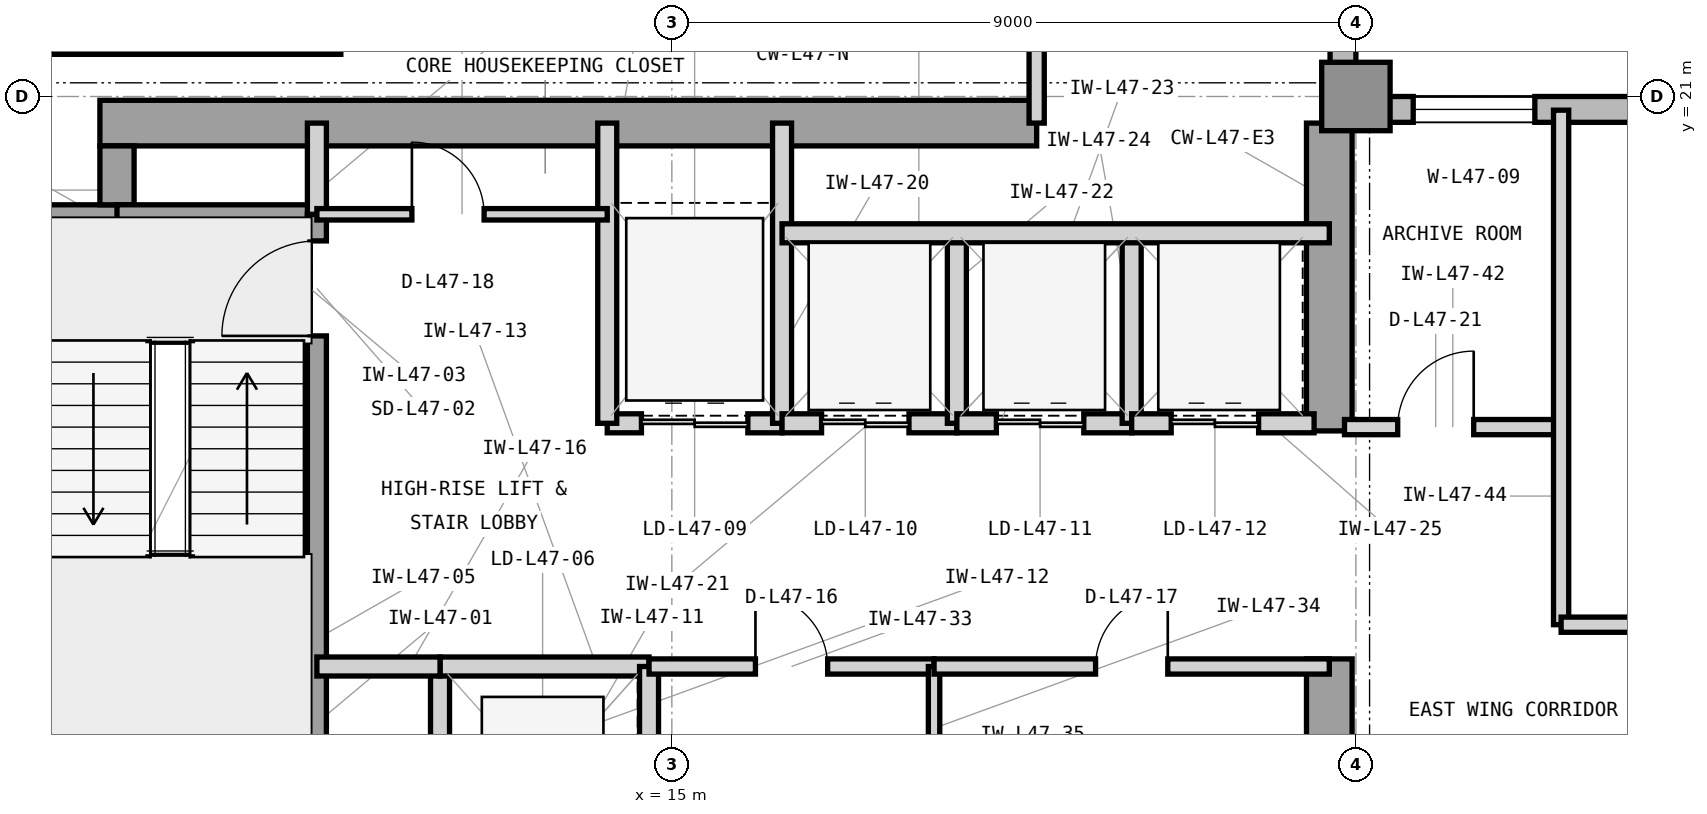
"""IFC4 building model, lengths in metres.
Left out: names, types, materials, properties, quantities, classifications, styles, units other than length and angle.
Written with IfcOpenShell. Run it as: python <this file> out.ifc"""

import sys

from ifc_helpers import new_model, si_unit, direction, frame, frame_2d, origin, origin_2d, place, context, subcontext, project, spatial, rectangle, extrude, element, fill, save


model = new_model("IFC4")
c1 = context("Model", 3, precision=1e-05, world=origin(), true_north=direction((0.0, 1.0)))
c2 = subcontext(c1, "Body", "Model", "MODEL_VIEW")
j1 = project(units=[si_unit("LENGTHUNIT", "METRE"), si_unit("PLANEANGLEUNIT", "RADIAN")], contexts=[c1])
p1 = place(None, origin())
s1 = spatial("IfcSite", under=j1, at=p1, CompositionType="ELEMENT")
p2 = place(p1, origin())
s2 = spatial("IfcBuilding", under=s1, at=p2, CompositionType="ELEMENT")
p3 = place(p2, frame((0.0, 0.0, 195.6)))
s3 = spatial("IfcBuildingStorey", under=s2, at=p3, CompositionType="ELEMENT", Elevation=195.6)
p4 = place(p3, frame((7.475, 20.65, 0.0), z_axis=(0.0, 0.0, 1.0), x_axis=(1.0, 0.0, 0.0)))
e1 = element("IfcWall", 1, at=p4, inside=s3, PredefinedType="SHEAR", context=c2, shape_type="SweptSolid", body=[
    extrude(rectangle(XDim=12.325, YDim=0.6, at=frame_2d((6.163, 0.0))), origin(), (0.0, 0.0, 1.0), 3.9),
])
p5 = place(p3, frame((23.65, 10.4, 0.0), z_axis=(0.0, 0.0, 1.0), x_axis=(0.0, 1.0, 0.0)))
e2 = element("IfcWall", 2, at=p5, inside=s3, PredefinedType="SHEAR", context=c2, shape_type="SweptSolid", body=[
    extrude(rectangle(XDim=3.2, YDim=0.6, at=frame_2d((1.6, 0.0))), origin(), (0.0, 0.0, 1.0), 3.9),
])
p6 = place(p3, frame((23.65, 16.6, 0.0), z_axis=(0.0, 0.0, 1.0), x_axis=(0.0, 1.0, 0.0)))
e3 = element("IfcWall", 3, at=p6, inside=s3, PredefinedType="SHEAR", context=c2, shape_type="SweptSolid", body=[
    extrude(rectangle(XDim=4.05, YDim=0.6, at=frame_2d((2.025, 0.0))), origin(), (0.0, 0.0, 1.0), 3.9),
])
p7 = place(p3, frame((6.65, 19.35, 0.0), z_axis=(0.0, 0.0, 1.0), x_axis=(1.0, 0.0, 0.0)))
e4 = element("IfcWall", 4, at=p7, inside=s3, PredefinedType="SHEAR", context=c2, shape_type="SweptSolid", body=[
    extrude(rectangle(XDim=1.275, YDim=0.45, at=frame_2d((0.638, 0.0))), origin(), (0.0, 0.0, 1.0), 3.9),
])
p8 = place(p3, frame((7.7, 19.575, 0.0), z_axis=(0.0, 0.0, 1.0), x_axis=(0.0, 1.0, 0.0)))
e5 = element("IfcWall", 5, at=p8, inside=s3, PredefinedType="SHEAR", context=c2, shape_type="SweptSolid", body=[
    extrude(rectangle(XDim=0.775, YDim=0.45, at=frame_2d((0.388, 0.0))), origin(), (0.0, 0.0, 1.0), 3.9),
])
p9 = place(p3, frame((24.0, 21.0, 0.0), z_axis=(0.0, 0.0, 1.0), x_axis=(1.0, 0.0, 0.0)))
e6 = element("IfcColumn", 6, at=p9, inside=s3, PredefinedType="COLUMN", context=c2, shape_type="SweptSolid", body=[
    extrude(rectangle(XDim=0.9, YDim=0.9, at=origin_2d()), origin(), (0.0, 0.0, 1.0), 3.9),
])
p10 = place(p3, frame((55.4, 20.83, 0.0), z_axis=(0.0, 0.0, 1.0), x_axis=(-1.0, 0.0, 0.0)))
e7 = element("IfcWall", 7, at=p10, inside=s3, PredefinedType="STANDARD", context=c2, shape_type="SweptSolid", body=[
    extrude(rectangle(XDim=31.4, YDim=0.34, at=frame_2d((15.7, 0.0))), origin(), (0.0, 0.0, 1.0), 3.7),
])
p11 = place(p10, frame((17.167, 0.0, 0.9)))
e8 = element("IfcOpeningElement", 8, at=p11, cuts=e7, PredefinedType="OPENING", context=c2, shape_type="SweptSolid", body=[
    extrude(rectangle(XDim=2.3, YDim=2.2, at=frame_2d((1.15, 1.1))), frame((0.0, 0.18, 0.0), z_axis=(0.0, -1.0, 0.0), x_axis=(1.0, 0.0, 0.0)), (0.0, 0.0, 1.0), 0.36),
])
p12 = place(p10, frame((29.046, 0.0, 0.9)))
e9 = element("IfcOpeningElement", 9, at=p12, cuts=e7, PredefinedType="OPENING", context=c2, shape_type="SweptSolid", body=[
    extrude(rectangle(XDim=1.6, YDim=2.2, at=frame_2d((0.8, 1.1))), frame((0.0, 0.18, 0.0), z_axis=(0.0, -1.0, 0.0), x_axis=(1.0, 0.0, 0.0)), (0.0, 0.0, 1.0), 0.36),
])
p13 = place(p10, frame((8.375, 0.0, 0.9)))
e10 = element("IfcOpeningElement", 10, at=p13, cuts=e7, PredefinedType="OPENING", context=c2, shape_type="SweptSolid", body=[
    extrude(rectangle(XDim=2.3, YDim=2.2, at=frame_2d((1.15, 1.1))), frame((0.0, 0.18, 0.0), z_axis=(0.0, -1.0, 0.0), x_axis=(1.0, 0.0, 0.0)), (0.0, 0.0, 1.0), 0.36),
])
p14 = place(p3, frame((23.83, 21.0, 0.0), z_axis=(0.0, 0.0, 1.0), x_axis=(0.0, 1.0, 0.0)))
e11 = element("IfcWall", 11, at=p14, inside=s3, PredefinedType="STANDARD", context=c2, shape_type="SweptSolid", body=[
    extrude(rectangle(XDim=22.4, YDim=0.34, at=frame_2d((11.2, 0.0))), origin(), (0.0, 0.0, 1.0), 3.7),
])
p15 = place(p3, frame((7.7, 19.45, 0.0), z_axis=(0.0, 0.0, 1.0), x_axis=(1.0, 0.0, 0.0)))
e12 = element("IfcWall", 12, at=p15, inside=s3, PredefinedType="SHEAR", context=c2, shape_type="SweptSolid", body=[
    extrude(rectangle(XDim=2.755, YDim=0.25, at=frame_2d((1.377, 0.0))), origin(), (0.0, 0.0, 1.0), 3.9),
])
p16 = place(p3, frame((10.33, 12.0, 0.0), z_axis=(0.0, 0.0, 1.0), x_axis=(0.0, 1.0, 0.0)))
e13 = element("IfcWall", 13, at=p16, inside=s3, PredefinedType="SHEAR", context=c2, shape_type="SweptSolid", body=[
    extrude(rectangle(XDim=7.45, YDim=0.25, at=frame_2d((3.725, 0.0))), origin(), (0.0, 0.0, 1.0), 3.9),
])
p17 = place(p16, frame((5.85, 0.0, 0.0)))
e14 = element("IfcOpeningElement", 14, at=p17, cuts=e13, PredefinedType="OPENING", context=c2, shape_type="SweptSolid", body=[
    extrude(rectangle(XDim=1.25, YDim=2.2, at=frame_2d((0.625, 1.1))), frame((0.0, 0.135, 0.0), z_axis=(0.0, -1.0, 0.0), x_axis=(1.0, 0.0, 0.0)), (0.0, 0.0, 1.0), 0.27),
])
p18 = place(p3, frame((10.33, 19.45, 0.0), z_axis=(0.0, 0.0, 1.0), x_axis=(0.0, 1.0, 0.0)))
e15 = element("IfcWall", 15, at=p18, inside=s3, PredefinedType="PARTITIONING", context=c2, shape_type="SweptSolid", body=[
    extrude(rectangle(XDim=1.2, YDim=0.25, at=frame_2d((0.6, 0.0))), origin(), (0.0, 0.0, 1.0), 3.69),
])
p19 = place(p3, frame((11.95, 10.5, 0.0), z_axis=(0.0, 0.0, 1.0), x_axis=(0.0, 1.0, 0.0)))
e16 = element("IfcWall", 16, at=p19, inside=s3, PredefinedType="PARTITIONING", context=c2, shape_type="SweptSolid", body=[
    extrude(rectangle(XDim=3.0, YDim=0.25, at=frame_2d((1.5, 0.0))), origin(), (0.0, 0.0, 1.0), 3.69),
])
p20 = place(p3, frame((11.95, 13.5, 0.0), z_axis=(0.0, 0.0, 1.0), x_axis=(1.0, 0.0, 0.0)))
e17 = element("IfcWall", 17, at=p20, inside=s3, PredefinedType="PARTITIONING", context=c2, shape_type="SweptSolid", body=[
    extrude(rectangle(XDim=2.75, YDim=0.25, at=frame_2d((1.375, 0.0))), origin(), (0.0, 0.0, 1.0), 3.283),
])
p21 = place(p3, frame((14.7, 10.5, 0.0), z_axis=(0.0, 0.0, 1.0), x_axis=(0.0, 1.0, 0.0)))
e18 = element("IfcWall", 18, at=p21, inside=s3, PredefinedType="PARTITIONING", context=c2, shape_type="SweptSolid", body=[
    extrude(rectangle(XDim=3.0, YDim=0.25, at=frame_2d((1.5, 0.0))), origin(), (0.0, 0.0, 1.0), 3.69),
])
p22 = place(p3, frame((10.33, 13.5, 0.0), z_axis=(0.0, 0.0, 1.0), x_axis=(1.0, 0.0, 0.0)))
e19 = element("IfcWall", 19, at=p22, inside=s3, PredefinedType="PARTITIONING", context=c2, shape_type="SweptSolid", body=[
    extrude(rectangle(XDim=1.62, YDim=0.25, at=frame_2d((0.81, 0.0))), origin(), (0.0, 0.0, 1.0), 3.283),
])
p23 = place(p3, frame((14.15, 16.7, 0.0), z_axis=(0.0, 0.0, 1.0), x_axis=(1.0, 0.0, 0.0)))
e20 = element("IfcWall", 20, at=p23, inside=s3, PredefinedType="PARTITIONING", context=c2, shape_type="SweptSolid", body=[
    extrude(rectangle(XDim=2.3, YDim=0.25, at=frame_2d((1.15, 0.0))), origin(), (0.0, 0.0, 1.0), 3.283),
])
p24 = place(p23, frame((0.45, 0.0, 0.0)))
e21 = element("IfcOpeningElement", 21, at=p24, cuts=e20, PredefinedType="OPENING", context=c2, shape_type="SweptSolid", body=[
    extrude(rectangle(XDim=1.4, YDim=2.35, at=frame_2d((0.7, 1.175))), frame((0.0, 0.135, 0.0), z_axis=(0.0, -1.0, 0.0), x_axis=(1.0, 0.0, 0.0)), (0.0, 0.0, 1.0), 0.27),
])
for number, where, z_axis, x_axis in (
    (22, (14.15, 16.7, 0.0), (0.0, 0.0, 1.0), (0.0, 1.0, 0.0)),
    (23, (16.45, 16.7, 0.0), (0.0, 0.0, 1.0), (0.0, 1.0, 0.0)),
):
    element("IfcWall", number, at=place(p3, frame(where, z_axis=z_axis, x_axis=x_axis)), inside=s3, PredefinedType="PARTITIONING", context=c2, shape_type="SweptSolid", body=[
        extrude(rectangle(XDim=3.95, YDim=0.25, at=frame_2d((1.975, 0.0))), origin(), (0.0, 0.0, 1.0), 3.69),
    ])
p25 = place(p3, frame((16.45, 16.7, 0.0), z_axis=(0.0, 0.0, 1.0), x_axis=(1.0, 0.0, 0.0)))
e24 = element("IfcWall", 24, at=p25, inside=s3, PredefinedType="PARTITIONING", context=c2, shape_type="SweptSolid", body=[
    extrude(rectangle(XDim=2.3, YDim=0.25, at=frame_2d((1.15, 0.0))), origin(), (0.0, 0.0, 1.0), 3.283),
])
p26 = place(p25, frame((0.52, 0.0, 0.0)))
e25 = element("IfcOpeningElement", 25, at=p26, cuts=e24, PredefinedType="OPENING", context=c2, shape_type="SweptSolid", body=[
    extrude(rectangle(XDim=1.15, YDim=2.25, at=frame_2d((0.575, 1.125))), frame((0.0, 0.135, 0.0), z_axis=(0.0, -1.0, 0.0), x_axis=(1.0, 0.0, 0.0)), (0.0, 0.0, 1.0), 0.27),
])
p27 = place(p3, frame((18.75, 16.7, 0.0), z_axis=(0.0, 0.0, 1.0), x_axis=(0.0, 1.0, 0.0)))
e26 = element("IfcWall", 26, at=p27, inside=s3, PredefinedType="PARTITIONING", context=c2, shape_type="SweptSolid", body=[
    extrude(rectangle(XDim=2.5, YDim=0.25, at=frame_2d((1.25, 0.0))), origin(), (0.0, 0.0, 1.0), 3.69),
])
p28 = place(p3, frame((18.75, 16.7, 0.0), z_axis=(0.0, 0.0, 1.0), x_axis=(1.0, 0.0, 0.0)))
e27 = element("IfcWall", 27, at=p28, inside=s3, PredefinedType="PARTITIONING", context=c2, shape_type="SweptSolid", body=[
    extrude(rectangle(XDim=2.3, YDim=0.25, at=frame_2d((1.15, 0.0))), origin(), (0.0, 0.0, 1.0), 3.283),
])
p29 = place(p28, frame((0.52, 0.0, 0.0)))
e28 = element("IfcOpeningElement", 28, at=p29, cuts=e27, PredefinedType="OPENING", context=c2, shape_type="SweptSolid", body=[
    extrude(rectangle(XDim=1.15, YDim=2.25, at=frame_2d((0.575, 1.125))), frame((0.0, 0.135, 0.0), z_axis=(0.0, -1.0, 0.0), x_axis=(1.0, 0.0, 0.0)), (0.0, 0.0, 1.0), 0.27),
])
p30 = place(p3, frame((21.05, 16.7, 0.0), z_axis=(0.0, 0.0, 1.0), x_axis=(0.0, 1.0, 0.0)))
e29 = element("IfcWall", 29, at=p30, inside=s3, PredefinedType="PARTITIONING", context=c2, shape_type="SweptSolid", body=[
    extrude(rectangle(XDim=2.5, YDim=0.25, at=frame_2d((1.25, 0.0))), origin(), (0.0, 0.0, 1.0), 3.69),
])
p31 = place(p3, frame((21.05, 16.7, 0.0), z_axis=(0.0, 0.0, 1.0), x_axis=(1.0, 0.0, 0.0)))
e30 = element("IfcWall", 30, at=p31, inside=s3, PredefinedType="PARTITIONING", context=c2, shape_type="SweptSolid", body=[
    extrude(rectangle(XDim=2.4, YDim=0.25, at=frame_2d((1.2, 0.0))), origin(), (0.0, 0.0, 1.0), 3.283),
])
p32 = place(p31, frame((0.52, 0.0, 0.0)))
e31 = element("IfcOpeningElement", 31, at=p32, cuts=e30, PredefinedType="OPENING", context=c2, shape_type="SweptSolid", body=[
    extrude(rectangle(XDim=1.15, YDim=2.25, at=frame_2d((0.575, 1.125))), frame((0.0, 0.135, 0.0), z_axis=(0.0, -1.0, 0.0), x_axis=(1.0, 0.0, 0.0)), (0.0, 0.0, 1.0), 0.27),
])
p33 = place(p3, frame((16.45, 19.2, 0.0), z_axis=(0.0, 0.0, 1.0), x_axis=(1.0, 0.0, 0.0)))
e32 = element("IfcWall", 32, at=p33, inside=s3, PredefinedType="PARTITIONING", context=c2, shape_type="SweptSolid", body=[
    extrude(rectangle(XDim=7.2, YDim=0.25, at=frame_2d((3.6, 0.0))), origin(), (0.0, 0.0, 1.0), 3.69),
])
p34 = place(p3, frame((14.7, 13.5, 0.0), z_axis=(0.0, 0.0, 1.0), x_axis=(1.0, 0.0, 0.0)))
e33 = element("IfcWall", 33, at=p34, inside=s3, PredefinedType="PARTITIONING", context=c2, shape_type="SweptSolid", body=[
    extrude(rectangle(XDim=3.75, YDim=0.2, at=frame_2d((1.875, 0.0))), origin(), (0.0, 0.0, 1.0), 3.283),
])
p35 = place(p34, frame((1.4, 0.0, 0.0)))
e34 = element("IfcOpeningElement", 34, at=p35, cuts=e33, PredefinedType="OPENING", context=c2, shape_type="SweptSolid", body=[
    extrude(rectangle(XDim=0.95, YDim=2.1, at=frame_2d((0.475, 1.05))), frame((0.0, 0.11, 0.0), z_axis=(0.0, -1.0, 0.0), x_axis=(1.0, 0.0, 0.0)), (0.0, 0.0, 1.0), 0.22),
])
p36 = place(p3, frame((18.45, 10.25, 0.0), z_axis=(0.0, 0.0, 1.0), x_axis=(0.0, 1.0, 0.0)))
e35 = element("IfcWall", 35, at=p36, inside=s3, PredefinedType="PARTITIONING", context=c2, shape_type="SweptSolid", body=[
    extrude(rectangle(XDim=3.25, YDim=0.15, at=frame_2d((1.625, 0.0))), origin(), (0.0, 0.0, 1.0), 3.69),
])
p37 = place(p3, frame((18.45, 13.5, 0.0), z_axis=(0.0, 0.0, 1.0), x_axis=(1.0, 0.0, 0.0)))
e36 = element("IfcWall", 36, at=p37, inside=s3, PredefinedType="PARTITIONING", context=c2, shape_type="SweptSolid", body=[
    extrude(rectangle(XDim=5.2, YDim=0.2, at=frame_2d((2.6, 0.0))), origin(), (0.0, 0.0, 1.0), 3.283),
])
p38 = place(p37, frame((2.125, 0.0, 0.0)))
e37 = element("IfcOpeningElement", 37, at=p38, cuts=e36, PredefinedType="OPENING", context=c2, shape_type="SweptSolid", body=[
    extrude(rectangle(XDim=0.95, YDim=2.1, at=frame_2d((0.475, 1.05))), frame((0.0, 0.11, 0.0), z_axis=(0.0, -1.0, 0.0), x_axis=(1.0, 0.0, 0.0)), (0.0, 0.0, 1.0), 0.22),
])
p39 = place(p3, frame((10.33, 19.45, 0.0), z_axis=(0.0, 0.0, 1.0), x_axis=(1.0, 0.0, 0.0)))
e38 = element("IfcWall", 38, at=p39, inside=s3, PredefinedType="PARTITIONING", context=c2, shape_type="SweptSolid", body=[
    extrude(rectangle(XDim=3.82, YDim=0.15, at=frame_2d((1.91, 0.0))), origin(), (0.0, 0.0, 1.0), 3.69),
])
p40 = place(p39, frame((1.25, 0.0, 0.0)))
e39 = element("IfcOpeningElement", 39, at=p40, cuts=e38, PredefinedType="OPENING", context=c2, shape_type="SweptSolid", body=[
    extrude(rectangle(XDim=0.95, YDim=2.1, at=frame_2d((0.475, 1.05))), frame((0.0, 0.085, 0.0), z_axis=(0.0, -1.0, 0.0), x_axis=(1.0, 0.0, 0.0)), (0.0, 0.0, 1.0), 0.17),
])
p41 = place(p3, frame((6.555, 21.68, 0.0), z_axis=(0.0, 0.0, 1.0), x_axis=(1.0, 0.0, 0.0)))
e40 = element("IfcWall", 40, at=p41, inside=s3, PredefinedType="SHEAR", context=c2, shape_type="SweptSolid", body=[
    extrude(rectangle(XDim=4.09, YDim=0.25, at=frame_2d((2.045, 0.0))), origin(), (0.0, 0.0, 1.0), 3.9),
])
p42 = place(p3, frame((23.85, 16.65, 0.0), z_axis=(0.0, 0.0, 1.0), x_axis=(1.0, 0.0, 0.0)))
e41 = element("IfcWall", 41, at=p42, inside=s3, PredefinedType="PARTITIONING", context=c2, shape_type="SweptSolid", body=[
    extrude(rectangle(XDim=2.85, YDim=0.2, at=frame_2d((1.425, 0.0))), origin(), (0.0, 0.0, 1.0), 3.69),
])
p43 = place(p42, frame((0.7, 0.0, 0.0)))
e42 = element("IfcOpeningElement", 42, at=p43, cuts=e41, PredefinedType="OPENING", context=c2, shape_type="SweptSolid", body=[
    extrude(rectangle(XDim=1.0, YDim=2.15, at=frame_2d((0.5, 1.075))), frame((0.0, 0.11, 0.0), z_axis=(0.0, -1.0, 0.0), x_axis=(1.0, 0.0, 0.0)), (0.0, 0.0, 1.0), 0.22),
])
p44 = place(p3, frame((26.7, 14.05, 0.0), z_axis=(0.0, 0.0, 1.0), x_axis=(0.0, 1.0, 0.0)))
e43 = element("IfcWall", 43, at=p44, inside=s3, PredefinedType="PARTITIONING", context=c2, shape_type="SweptSolid", body=[
    extrude(rectangle(XDim=6.77, YDim=0.2, at=frame_2d((3.385, 0.0))), origin(), (0.0, 0.0, 1.0), 3.69),
])
p45 = place(p3, frame((26.7, 14.05, 0.0), z_axis=(0.0, 0.0, 1.0), x_axis=(1.0, 0.0, 0.0)))
e44 = element("IfcWall", 44, at=p45, inside=s3, PredefinedType="PARTITIONING", context=c2, shape_type="SweptSolid", body=[
    extrude(rectangle(XDim=8.5, YDim=0.2, at=frame_2d((4.25, 0.0))), origin(), (0.0, 0.0, 1.0), 3.69),
])
p46 = place(p45, frame((3.5, 0.0, 0.0)))
e45 = element("IfcOpeningElement", 45, at=p46, cuts=e44, PredefinedType="OPENING", context=c2, shape_type="SweptSolid", body=[
    extrude(rectangle(XDim=1.5, YDim=2.3, at=frame_2d((0.75, 1.15))), frame((0.0, 0.11, 0.0), z_axis=(0.0, -1.0, 0.0), x_axis=(1.0, 0.0, 0.0)), (0.0, 0.0, 1.0), 0.22),
])
p47 = place(p3, frame((19.8, 20.65, 0.0), z_axis=(0.0, 0.0, 1.0), x_axis=(0.0, 1.0, 0.0)))
e46 = element("IfcWall", 46, at=p47, inside=s3, PredefinedType="PARTITIONING", context=c2, shape_type="SweptSolid", body=[
    extrude(rectangle(XDim=6.15, YDim=0.2, at=frame_2d((3.075, 0.0))), origin(), (0.0, 0.0, 1.0), 3.69),
])
p48 = place(p17, origin())
e47 = element("IfcDoor", 47, at=p48, inside=s3, OperationType="SINGLE_SWING_LEFT", PredefinedType="DOOR", context=c2, shape_type="SweptSolid", body=[
    extrude(rectangle(XDim=1.25, YDim=2.2, at=frame_2d((0.625, 1.1))), frame((0.0, 0.025, 0.0), z_axis=(0.0, -1.0, 0.0), x_axis=(1.0, 0.0, 0.0)), (0.0, 0.0, 1.0), 0.05),
])
fill(e14, e47)
p49 = place(p24, origin())
e48 = element("IfcDoor", 48, at=p49, inside=s3, OperationType="DOUBLE_DOOR_SLIDING", PredefinedType="DOOR", context=c2, shape_type="SweptSolid", body=[
    extrude(rectangle(XDim=1.4, YDim=2.35, at=frame_2d((0.7, 1.175))), frame((0.0, 0.025, 0.0), z_axis=(0.0, -1.0, 0.0), x_axis=(1.0, 0.0, 0.0)), (0.0, 0.0, 1.0), 0.05),
])
fill(e21, e48)
p50 = place(p26, origin())
e49 = element("IfcDoor", 49, at=p50, inside=s3, OperationType="DOUBLE_DOOR_SLIDING", PredefinedType="DOOR", context=c2, shape_type="SweptSolid", body=[
    extrude(rectangle(XDim=1.15, YDim=2.25, at=frame_2d((0.575, 1.125))), frame((0.0, 0.025, 0.0), z_axis=(0.0, -1.0, 0.0), x_axis=(1.0, 0.0, 0.0)), (0.0, 0.0, 1.0), 0.05),
])
fill(e25, e49)
p51 = place(p29, origin())
e50 = element("IfcDoor", 50, at=p51, inside=s3, OperationType="DOUBLE_DOOR_SLIDING", PredefinedType="DOOR", context=c2, shape_type="SweptSolid", body=[
    extrude(rectangle(XDim=1.15, YDim=2.25, at=frame_2d((0.575, 1.125))), frame((0.0, 0.025, 0.0), z_axis=(0.0, -1.0, 0.0), x_axis=(1.0, 0.0, 0.0)), (0.0, 0.0, 1.0), 0.05),
])
fill(e28, e50)
p52 = place(p32, origin())
e51 = element("IfcDoor", 51, at=p52, inside=s3, OperationType="DOUBLE_DOOR_SLIDING", PredefinedType="DOOR", context=c2, shape_type="SweptSolid", body=[
    extrude(rectangle(XDim=1.15, YDim=2.25, at=frame_2d((0.575, 1.125))), frame((0.0, 0.025, 0.0), z_axis=(0.0, -1.0, 0.0), x_axis=(1.0, 0.0, 0.0)), (0.0, 0.0, 1.0), 0.05),
])
fill(e31, e51)
p53 = place(p35, origin())
e52 = element("IfcDoor", 52, at=p53, inside=s3, OperationType="SINGLE_SWING_LEFT", PredefinedType="DOOR", context=c2, shape_type="SweptSolid", body=[
    extrude(rectangle(XDim=0.95, YDim=2.1, at=frame_2d((0.475, 1.05))), frame((0.0, 0.025, 0.0), z_axis=(0.0, -1.0, 0.0), x_axis=(1.0, 0.0, 0.0)), (0.0, 0.0, 1.0), 0.05),
])
fill(e34, e52)
p54 = place(p38, origin())
e53 = element("IfcDoor", 53, at=p54, inside=s3, OperationType="SINGLE_SWING_RIGHT", PredefinedType="DOOR", context=c2, shape_type="SweptSolid", body=[
    extrude(rectangle(XDim=0.95, YDim=2.1, at=frame_2d((0.475, 1.05))), frame((0.0, 0.025, 0.0), z_axis=(0.0, -1.0, 0.0), x_axis=(1.0, 0.0, 0.0)), (0.0, 0.0, 1.0), 0.05),
])
fill(e37, e53)
p55 = place(p40, origin())
e54 = element("IfcDoor", 54, at=p55, inside=s3, OperationType="SINGLE_SWING_LEFT", PredefinedType="DOOR", context=c2, shape_type="SweptSolid", body=[
    extrude(rectangle(XDim=0.95, YDim=2.1, at=frame_2d((0.475, 1.05))), frame((0.0, 0.025, 0.0), z_axis=(0.0, -1.0, 0.0), x_axis=(1.0, 0.0, 0.0)), (0.0, 0.0, 1.0), 0.05),
])
fill(e39, e54)
p56 = place(p43, origin())
e55 = element("IfcDoor", 55, at=p56, inside=s3, OperationType="SINGLE_SWING_RIGHT", PredefinedType="DOOR", context=c2, shape_type="SweptSolid", body=[
    extrude(rectangle(XDim=1.0, YDim=2.15, at=frame_2d((0.5, 1.075))), frame((0.0, 0.025, 0.0), z_axis=(0.0, -1.0, 0.0), x_axis=(1.0, 0.0, 0.0)), (0.0, 0.0, 1.0), 0.05),
])
fill(e42, e55)
p57 = place(p12, origin())
e56 = element("IfcWindow", 56, at=p57, inside=s3, PartitioningType="SINGLE_PANEL", PredefinedType="WINDOW", context=c2, shape_type="SweptSolid", body=[
    extrude(rectangle(XDim=1.6, YDim=2.2, at=frame_2d((0.8, 1.1))), frame((0.0, 0.11, 0.0), z_axis=(0.0, -1.0, 0.0), x_axis=(1.0, 0.0, 0.0)), (0.0, 0.0, 1.0), 0.06),
])
fill(e9, e56)
save(model, sys.argv[1])
